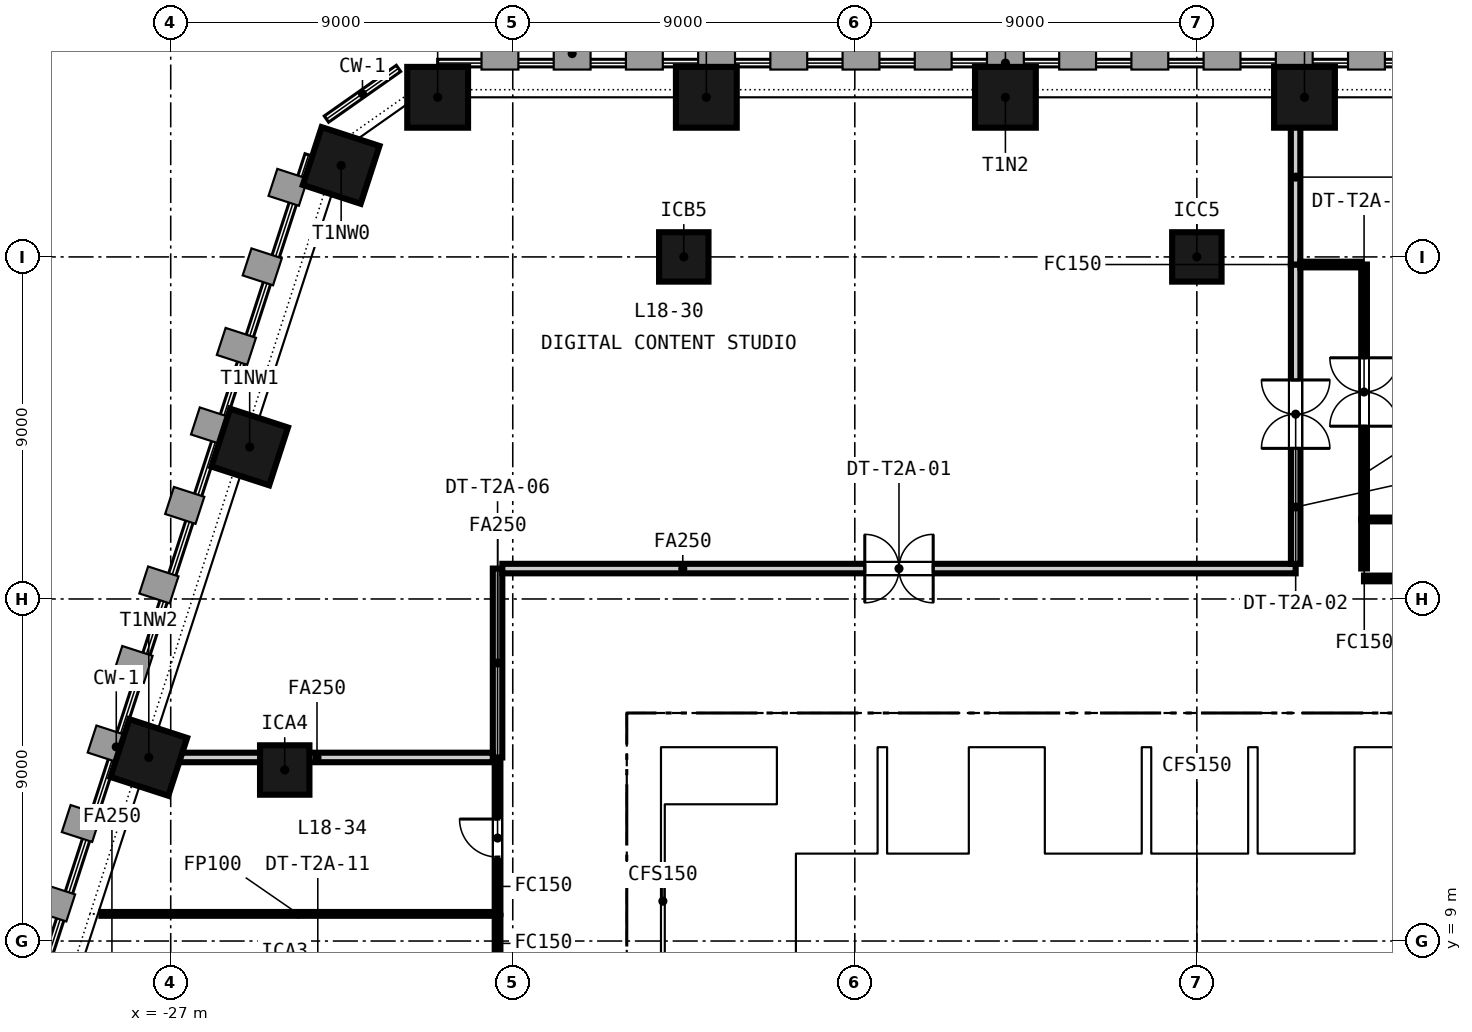
"""IFC4 building model, lengths in metres.
Left out: names, types, materials, properties, quantities, classifications, styles, units other than length and angle.
Written with IfcOpenShell. Run it as: python <this file> out.ifc"""

import sys

from ifc_helpers import new_model, si_unit, direction, frame, frame_2d, origin, origin_2d, place, context, subcontext, project, spatial, rectangle, extrude, element, fill, save


model = new_model("IFC4")
c1 = context("Model", 3, precision=1e-05, world=origin(), true_north=direction((0.0, 1.0)))
c2 = subcontext(c1, "Body", "Model", "MODEL_VIEW")
j1 = project(units=[si_unit("LENGTHUNIT", "METRE"), si_unit("PLANEANGLEUNIT", "RADIAN")], contexts=[c1])
p1 = place(None, origin())
s1 = spatial("IfcSite", under=j1, at=p1, CompositionType="ELEMENT")
p2 = place(p1, origin())
s2 = spatial("IfcBuilding", under=s1, at=p2, CompositionType="ELEMENT")
p3 = place(p2, frame((0.0, 0.0, 80.65)))
s3 = spatial("IfcBuildingStorey", under=s2, at=p3, CompositionType="ELEMENT", Elevation=80.65)
p4 = place(p3, frame((-15.0, 14.55, -0.15), z_axis=(0.0, 0.0, 1.0), x_axis=(1.0, 0.0, 0.0)))
e1 = element("IfcWall", 1, at=p4, inside=s3, PredefinedType="SOLIDWALL", context=c2, shape_type="SweptSolid", body=[
    extrude(rectangle(XDim=30.0, YDim=0.9, at=frame_2d((15.0, 0.0))), origin(), (0.0, 0.0, 1.0), 3.65),
])
p5 = place(p4, frame((9.25, 0.0, 0.15)))
e2 = element("IfcOpeningElement", 2, at=p5, cuts=e1, PredefinedType="OPENING", context=c2, shape_type="SweptSolid", body=[
    extrude(rectangle(XDim=1.5, YDim=2.1, at=frame_2d((0.75, 1.05))), frame((0.0, 0.46, 0.0), z_axis=(0.0, -1.0, 0.0), x_axis=(1.0, 0.0, 0.0)), (0.0, 0.0, 1.0), 0.92),
])
p6 = place(p4, frame((19.4, 0.0, 0.15)))
e3 = element("IfcOpeningElement", 3, at=p6, cuts=e1, PredefinedType="OPENING", context=c2, shape_type="SweptSolid", body=[
    extrude(rectangle(XDim=1.5, YDim=2.1, at=frame_2d((0.75, 1.05))), frame((0.0, 0.46, 0.0), z_axis=(0.0, -1.0, 0.0), x_axis=(1.0, 0.0, 0.0)), (0.0, 0.0, 1.0), 0.92),
])
p7 = place(p4, frame((1.5, 0.0, 0.15)))
e4 = element("IfcOpeningElement", 4, at=p7, cuts=e1, PredefinedType="OPENING", context=c2, shape_type="SweptSolid", body=[
    extrude(rectangle(XDim=1.2, YDim=2.1, at=frame_2d((0.6, 1.05))), frame((0.0, 0.46, 0.0), z_axis=(0.0, -1.0, 0.0), x_axis=(1.0, 0.0, 0.0)), (0.0, 0.0, 1.0), 0.92),
])
p8 = place(p4, frame((27.3, 0.0, 0.15)))
e5 = element("IfcOpeningElement", 5, at=p8, cuts=e1, PredefinedType="OPENING", context=c2, shape_type="SweptSolid", body=[
    extrude(rectangle(XDim=1.2, YDim=2.1, at=frame_2d((0.6, 1.05))), frame((0.0, 0.46, 0.0), z_axis=(0.0, -1.0, 0.0), x_axis=(1.0, 0.0, 0.0)), (0.0, 0.0, 1.0), 0.92),
])
p9 = place(p3, frame((-14.55, 0.9, -0.15), z_axis=(0.0, 0.0, 1.0), x_axis=(0.0, 1.0, 0.0)))
e6 = element("IfcWall", 6, at=p9, inside=s3, PredefinedType="SOLIDWALL", context=c2, shape_type="SweptSolid", body=[
    extrude(rectangle(XDim=13.2, YDim=0.9, at=frame_2d((6.6, 0.0))), origin(), (0.0, 0.0, 1.0), 3.65),
])
p10 = place(p3, frame((-10.8, 0.9, -0.15), z_axis=(0.0, 0.0, 1.0), x_axis=(0.0, 1.0, 0.0)))
e7 = element("IfcWall", 7, at=p10, inside=s3, PredefinedType="SOLIDWALL", context=c2, shape_type="SweptSolid", body=[
    extrude(rectangle(XDim=13.2, YDim=0.5, at=frame_2d((6.6, 0.0))), origin(), (0.0, 0.0, 1.0), 3.65),
])
for number, where, z_axis, x_axis in (
    (8, (2.832, 31.2, -0.15), (0.0, 0.0, 1.0), (-1.0, 0.0, 0.0)),
    (9, (-5.037, 31.2, -0.15), (0.0, 0.0, 1.0), (-1.0, 0.0, 0.0)),
    (10, (-12.907, 31.2, -0.15), (0.0, 0.0, 1.0), (-1.0, 0.0, 0.0)),
    (11, (-19.976, 31.2, -0.15), (0.0, 0.0, 1.0), (-1.0, 0.0, 0.0)),
    (12, (-22.515, 29.407, -0.15), (0.0, 0.0, 1.0), (-0.309, -0.951, 0.0)),
    (13, (-24.923, 21.999, -0.15), (0.0, 0.0, 1.0), (-0.309, -0.951, 0.0)),
    (14, (-27.577, 13.83, -0.15), (0.0, 0.0, 1.0), (-0.309, -0.951, 0.0)),
):
    element("IfcColumn", number, at=place(p3, frame(where, z_axis=z_axis, x_axis=x_axis)), inside=s3, PredefinedType="COLUMN", context=c2, shape_type="SweptSolid", body=[
        extrude(rectangle(XDim=1.6, YDim=1.6, at=origin_2d()), origin(), (0.0, 0.0, 1.0), 3.65),
    ])
for number, where, z_axis, x_axis in (
    (15, (-24.0, 13.5, -0.15), (0.0, 0.0, 1.0), (1.0, 0.0, 0.0)),
    (16, (-13.5, 27.0, -0.15), (0.0, 0.0, 1.0), (1.0, 0.0, 0.0)),
    (17, (0.0, 27.0, -0.15), (0.0, 0.0, 1.0), (1.0, 0.0, 0.0)),
):
    element("IfcColumn", number, at=place(p3, frame(where, z_axis=z_axis, x_axis=x_axis)), inside=s3, PredefinedType="COLUMN", context=c2, shape_type="SweptSolid", body=[
        extrude(rectangle(XDim=1.3, YDim=1.3, at=origin_2d()), origin(), (0.0, 0.0, 1.0), 3.65),
    ])
p11 = place(p3, frame((-10.55, 11.2, 0.0), z_axis=(0.0, 0.0, 1.0), x_axis=(1.0, 0.0, 0.0)))
e18 = element("IfcWall", 18, at=p11, inside=s3, PredefinedType="PARTITIONING", context=c2, shape_type="SweptSolid", body=[
    extrude(rectangle(XDim=4.8, YDim=0.2, at=frame_2d((2.4, 0.0))), origin(), (0.0, 0.0, 1.0), 3.5),
])
p12 = place(p11, frame((0.525, 0.0, 0.0)))
e19 = element("IfcOpeningElement", 19, at=p12, cuts=e18, PredefinedType="OPENING", context=c2, shape_type="SweptSolid", body=[
    extrude(rectangle(XDim=1.1, YDim=2.1, at=frame_2d((0.55, 1.05))), frame((0.0, 0.11, 0.0), z_axis=(0.0, -1.0, 0.0), x_axis=(1.0, 0.0, 0.0)), (0.0, 0.0, 1.0), 0.22),
])
p13 = place(p11, frame((2.925, 0.0, 0.0)))
e20 = element("IfcOpeningElement", 20, at=p13, cuts=e18, PredefinedType="OPENING", context=c2, shape_type="SweptSolid", body=[
    extrude(rectangle(XDim=1.1, YDim=2.1, at=frame_2d((0.55, 1.05))), frame((0.0, 0.11, 0.0), z_axis=(0.0, -1.0, 0.0), x_axis=(1.0, 0.0, 0.0)), (0.0, 0.0, 1.0), 0.22),
])
p14 = place(p3, frame((-4.25, 11.2, 0.0), z_axis=(0.0, 0.0, 1.0), x_axis=(1.0, 0.0, 0.0)))
e21 = element("IfcWall", 21, at=p14, inside=s3, PredefinedType="PARTITIONING", context=c2, shape_type="SweptSolid", body=[
    extrude(rectangle(XDim=8.65, YDim=0.2, at=frame_2d((4.325, 0.0))), origin(), (0.0, 0.0, 1.0), 3.5),
])
p15 = place(p14, frame((0.825, 0.0, 0.0)))
e22 = element("IfcOpeningElement", 22, at=p15, cuts=e21, PredefinedType="OPENING", context=c2, shape_type="SweptSolid", body=[
    extrude(rectangle(XDim=1.4, YDim=2.1, at=frame_2d((0.7, 1.05))), frame((0.0, 0.11, 0.0), z_axis=(0.0, -1.0, 0.0), x_axis=(1.0, 0.0, 0.0)), (0.0, 0.0, 1.0), 0.22),
])
p16 = place(p14, frame((3.625, 0.0, 0.0)))
e23 = element("IfcOpeningElement", 23, at=p16, cuts=e21, PredefinedType="OPENING", context=c2, shape_type="SweptSolid", body=[
    extrude(rectangle(XDim=1.4, YDim=2.1, at=frame_2d((0.7, 1.05))), frame((0.0, 0.11, 0.0), z_axis=(0.0, -1.0, 0.0), x_axis=(1.0, 0.0, 0.0)), (0.0, 0.0, 1.0), 0.22),
])
p17 = place(p3, frame((-4.125, 6.15, 0.0), z_axis=(0.0, 0.0, 1.0), x_axis=(0.0, 1.0, 0.0)))
e24 = element("IfcWall", 24, at=p17, inside=s3, PredefinedType="PARTITIONING", context=c2, shape_type="SweptSolid", body=[
    extrude(rectangle(XDim=4.95, YDim=0.25, at=frame_2d((2.475, 0.0))), origin(), (0.0, 0.0, 1.0), 3.5),
])
p18 = place(p17, frame((3.125, 0.0, 0.0)))
e25 = element("IfcOpeningElement", 25, at=p18, cuts=e24, PredefinedType="OPENING", context=c2, shape_type="SweptSolid", body=[
    extrude(rectangle(XDim=1.2, YDim=2.1, at=frame_2d((0.6, 1.05))), frame((0.0, 0.135, 0.0), z_axis=(0.0, -1.0, 0.0), x_axis=(1.0, 0.0, 0.0)), (0.0, 0.0, 1.0), 0.27),
])
for number, where, z_axis, x_axis in (
    (26, (-8.275, 11.3, 0.0), (0.0, 0.0, 1.0), (0.0, 1.0, 0.0)),
    (27, (-5.875, 11.3, 0.0), (0.0, 0.0, 1.0), (0.0, 1.0, 0.0)),
    (28, (-4.125, 11.3, 0.0), (0.0, 0.0, 1.0), (0.0, 1.0, 0.0)),
    (29, (-1.325, 11.3, 0.0), (0.0, 0.0, 1.0), (0.0, 1.0, 0.0)),
    (30, (1.475, 11.3, 0.0), (0.0, 0.0, 1.0), (0.0, 1.0, 0.0)),
    (31, (4.275, 11.3, 0.0), (0.0, 0.0, 1.0), (0.0, 1.0, 0.0)),
):
    element("IfcWall", number, at=place(p3, frame(where, z_axis=z_axis, x_axis=x_axis)), inside=s3, PredefinedType="PARTITIONING", context=c2, shape_type="SweptSolid", body=[
        extrude(rectangle(XDim=2.8, YDim=0.25, at=frame_2d((1.4, 0.0))), origin(), (0.0, 0.0, 1.0), 3.5),
    ])
p19 = place(p3, frame((-14.05, 0.9, 0.0), z_axis=(0.0, 0.0, 1.0), x_axis=(0.0, 1.0, 0.0)))
e32 = element("IfcWall", 32, at=p19, inside=s3, PredefinedType="SOLIDWALL", context=c2, shape_type="SweptSolid", body=[
    extrude(rectangle(XDim=13.2, YDim=0.1, at=frame_2d((6.6, 0.0))), origin(), (0.0, 0.0, 1.0), 3.5),
])
p20 = place(p3, frame((4.4, 26.8, 0.0), z_axis=(0.0, 0.0, 1.0), x_axis=(0.0, -1.0, 0.0)))
e33 = element("IfcWall", 33, at=p20, inside=s3, PredefinedType="PARTITIONING", context=c2, shape_type="SweptSolid", body=[
    extrude(rectangle(XDim=6.708, YDim=0.15, at=frame_2d((3.354, 0.0))), origin(), (0.0, 0.0, 1.0), 2.741),
])
p21 = place(p20, frame((2.454, 0.0, 0.0)))
e34 = element("IfcOpeningElement", 34, at=p21, cuts=e33, PredefinedType="OPENING", context=c2, shape_type="SweptSolid", body=[
    extrude(rectangle(XDim=1.8, YDim=2.1, at=frame_2d((0.9, 1.05))), frame((0.0, 0.085, 0.0), z_axis=(0.0, -1.0, 0.0), x_axis=(1.0, 0.0, 0.0)), (0.0, 0.0, 1.0), 0.17),
])
p22 = place(p3, frame((4.4, 20.092, 0.0), z_axis=(0.0, 0.0, 1.0), x_axis=(0.0, -1.0, 0.0)))
e35 = element("IfcWall", 35, at=p22, inside=s3, PredefinedType="PARTITIONING", context=c2, shape_type="SweptSolid", body=[
    extrude(rectangle(XDim=1.29, YDim=0.15, at=frame_2d((0.645, 0.0))), origin(), (0.0, 0.0, 1.0), 2.741),
])
p23 = place(p3, frame((-18.4, 13.83, 0.0), z_axis=(0.0, 0.0, 1.0), x_axis=(0.0, 1.0, 0.0)))
e36 = element("IfcWall", 36, at=p23, inside=s3, PredefinedType="PARTITIONING", context=c2, shape_type="SweptSolid", body=[
    extrude(rectangle(XDim=4.97, YDim=0.25, at=frame_2d((2.485, 0.0))), origin(), (0.0, 0.0, 1.0), 2.741),
])
p24 = place(p3, frame((-18.275, 18.8, 0.0), z_axis=(0.0, 0.0, 1.0), x_axis=(1.0, 0.0, 0.0)))
e37 = element("IfcWall", 37, at=p24, inside=s3, PredefinedType="PARTITIONING", context=c2, shape_type="SweptSolid", body=[
    extrude(rectangle(XDim=20.875, YDim=0.25, at=frame_2d((10.438, 0.0))), origin(), (0.0, 0.0, 1.0), 2.741),
])
p25 = place(p24, frame((9.538, 0.0, 0.0)))
e38 = element("IfcOpeningElement", 38, at=p25, cuts=e37, PredefinedType="OPENING", context=c2, shape_type="SweptSolid", body=[
    extrude(rectangle(XDim=1.8, YDim=2.1, at=frame_2d((0.9, 1.05))), frame((0.0, 0.135, 0.0), z_axis=(0.0, -1.0, 0.0), x_axis=(1.0, 0.0, 0.0)), (0.0, 0.0, 1.0), 0.27),
])
p26 = place(p3, frame((2.6, 18.925, 0.0), z_axis=(0.0, 0.0, 1.0), x_axis=(0.0, 1.0, 0.0)))
e39 = element("IfcWall", 39, at=p26, inside=s3, PredefinedType="PARTITIONING", context=c2, shape_type="SweptSolid", body=[
    extrude(rectangle(XDim=7.875, YDim=0.25, at=frame_2d((3.938, 0.0))), origin(), (0.0, 0.0, 1.0), 2.741),
])
p27 = place(p26, frame((3.038, 0.0, 0.0)))
e40 = element("IfcOpeningElement", 40, at=p27, cuts=e39, PredefinedType="OPENING", context=c2, shape_type="SweptSolid", body=[
    extrude(rectangle(XDim=1.8, YDim=2.1, at=frame_2d((0.9, 1.05))), frame((0.0, 0.135, 0.0), z_axis=(0.0, -1.0, 0.0), x_axis=(1.0, 0.0, 0.0)), (0.0, 0.0, 1.0), 0.27),
])
p28 = place(p3, frame((2.598, 26.8, 0.0), z_axis=(0.0, 0.0, 1.0), x_axis=(0.0, 1.0, 0.0)))
e41 = element("IfcWall", 41, at=p28, inside=s3, PredefinedType="PARTITIONING", context=c2, shape_type="SweptSolid", body=[
    extrude(rectangle(XDim=4.6, YDim=0.25, at=frame_2d((2.3, 0.0))), origin(), (0.0, 0.0, 1.0), 2.741),
])
p29 = place(p3, frame((-27.787, 13.83, 0.0), z_axis=(0.0, 0.0, 1.0), x_axis=(1.0, 0.0, 0.0)))
e42 = element("IfcWall", 42, at=p29, inside=s3, PredefinedType="PARTITIONING", context=c2, shape_type="SweptSolid", body=[
    extrude(rectangle(XDim=9.262, YDim=0.25, at=frame_2d((4.631, 0.0))), origin(), (0.0, 0.0, 1.0), 2.741),
])
p30 = place(p3, frame((2.725, 26.8, 0.0), z_axis=(0.0, 0.0, 1.0), x_axis=(1.0, 0.0, 0.0)))
e43 = element("IfcWall", 43, at=p30, inside=s3, PredefinedType="PARTITIONING", context=c2, shape_type="SweptSolid", body=[
    extrude(rectangle(XDim=1.6, YDim=0.15, at=frame_2d((0.8, 0.0))), origin(), (0.0, 0.0, 1.0), 2.741),
])
p31 = place(p3, frame((4.475, 20.092, 0.0), z_axis=(0.0, 0.0, 1.0), x_axis=(1.0, 0.0, 0.0)))
e44 = element("IfcWall", 44, at=p31, inside=s3, PredefinedType="PARTITIONING", context=c2, shape_type="SweptSolid", body=[
    extrude(rectangle(XDim=18.446, YDim=0.1, at=frame_2d((9.223, 0.0))), origin(), (0.0, 0.0, 1.0), 2.741),
])
p32 = place(p3, frame((14.2, 18.542, 0.0), z_axis=(0.0, 0.0, 1.0), x_axis=(-0.999999980148, -0.000199257761, 0.0)))
e45 = element("IfcWall", 45, at=p32, inside=s3, PredefinedType="PARTITIONING", context=c2, shape_type="SweptSolid", body=[
    extrude(rectangle(XDim=9.802, YDim=0.15, at=frame_2d((4.901, 0.0))), origin(), (0.0, 0.0, 1.0), 2.741),
])
p33 = place(p32, frame((4.401, 0.0, 0.0)))
e46 = element("IfcOpeningElement", 46, at=p33, cuts=e45, PredefinedType="OPENING", context=c2, shape_type="SweptSolid", body=[
    extrude(rectangle(XDim=1.0, YDim=2.1, at=frame_2d((0.5, 1.05))), frame((0.0, 0.085, 0.0), z_axis=(0.0, -1.0, 0.0), x_axis=(1.0, 0.0, 0.0)), (0.0, 0.0, 1.0), 0.17),
])
p34 = place(p3, frame((-18.4, 9.714, 0.0), z_axis=(0.0, 0.0, 1.0), x_axis=(0.0, 1.0, 0.0)))
e47 = element("IfcWall", 47, at=p34, inside=s3, PredefinedType="PARTITIONING", context=c2, shape_type="SweptSolid", body=[
    extrude(rectangle(XDim=3.991, YDim=0.15, at=frame_2d((1.996, 0.0))), origin(), (0.0, 0.0, 1.0), 2.741),
])
p35 = place(p34, frame((1.496, 0.0, 0.0)))
e48 = element("IfcOpeningElement", 48, at=p35, cuts=e47, PredefinedType="OPENING", context=c2, shape_type="SweptSolid", body=[
    extrude(rectangle(XDim=1.0, YDim=2.1, at=frame_2d((0.5, 1.05))), frame((0.0, 0.085, 0.0), z_axis=(0.0, -1.0, 0.0), x_axis=(1.0, 0.0, 0.0)), (0.0, 0.0, 1.0), 0.17),
])
p36 = place(p3, frame((-28.824, 9.714, 0.0), z_axis=(0.0, 0.0, 1.0), x_axis=(1.0, 0.0, 0.0)))
e49 = element("IfcWall", 49, at=p36, inside=s3, PredefinedType="PARTITIONING", context=c2, shape_type="SweptSolid", body=[
    extrude(rectangle(XDim=10.349, YDim=0.1, at=frame_2d((5.174, 0.0))), origin(), (0.0, 0.0, 1.0), 2.741),
])
p37 = place(p3, frame((-18.4, 5.711, 0.0), z_axis=(0.0, 0.0, 1.0), x_axis=(0.0, 1.0, 0.0)))
e50 = element("IfcWall", 50, at=p37, inside=s3, PredefinedType="PARTITIONING", context=c2, shape_type="SweptSolid", body=[
    extrude(rectangle(XDim=3.953, YDim=0.15, at=frame_2d((1.977, 0.0))), origin(), (0.0, 0.0, 1.0), 2.741),
])
p38 = place(p37, frame((1.451, 0.0, 0.0)))
e51 = element("IfcOpeningElement", 51, at=p38, cuts=e50, PredefinedType="OPENING", context=c2, shape_type="SweptSolid", body=[
    extrude(rectangle(XDim=1.0, YDim=2.1, at=frame_2d((0.5, 1.05))), frame((0.0, 0.085, 0.0), z_axis=(0.0, -1.0, 0.0), x_axis=(1.0, 0.0, 0.0)), (0.0, 0.0, 1.0), 0.17),
])
p39 = place(p18, origin())
e52 = element("IfcDoor", 52, at=p39, inside=s3, OperationType="SINGLE_SWING_LEFT", PredefinedType="DOOR", context=c2, shape_type="SweptSolid", body=[
    extrude(rectangle(XDim=1.2, YDim=2.1, at=frame_2d((0.6, 1.05))), frame((0.0, 0.025, 0.0), z_axis=(0.0, -1.0, 0.0), x_axis=(1.0, 0.0, 0.0)), (0.0, 0.0, 1.0), 0.05),
])
fill(e25, e52)
p40 = place(p12, origin())
e53 = element("IfcDoor", 53, at=p40, inside=s3, OperationType="DOUBLE_DOOR_SLIDING", PredefinedType="DOOR", context=c2, shape_type="SweptSolid", body=[
    extrude(rectangle(XDim=1.1, YDim=2.1, at=frame_2d((0.55, 1.05))), frame((0.0, 0.025, 0.0), z_axis=(0.0, -1.0, 0.0), x_axis=(1.0, 0.0, 0.0)), (0.0, 0.0, 1.0), 0.05),
])
fill(e19, e53)
p41 = place(p13, origin())
e54 = element("IfcDoor", 54, at=p41, inside=s3, OperationType="DOUBLE_DOOR_SLIDING", PredefinedType="DOOR", context=c2, shape_type="SweptSolid", body=[
    extrude(rectangle(XDim=1.1, YDim=2.1, at=frame_2d((0.55, 1.05))), frame((0.0, 0.025, 0.0), z_axis=(0.0, -1.0, 0.0), x_axis=(1.0, 0.0, 0.0)), (0.0, 0.0, 1.0), 0.05),
])
fill(e20, e54)
p42 = place(p15, origin())
e55 = element("IfcDoor", 55, at=p42, inside=s3, OperationType="DOUBLE_DOOR_SLIDING", PredefinedType="DOOR", context=c2, shape_type="SweptSolid", body=[
    extrude(rectangle(XDim=1.4, YDim=2.1, at=frame_2d((0.7, 1.05))), frame((0.0, 0.025, 0.0), z_axis=(0.0, -1.0, 0.0), x_axis=(1.0, 0.0, 0.0)), (0.0, 0.0, 1.0), 0.05),
])
fill(e22, e55)
p43 = place(p16, origin())
e56 = element("IfcDoor", 56, at=p43, inside=s3, OperationType="DOUBLE_DOOR_SLIDING", PredefinedType="DOOR", context=c2, shape_type="SweptSolid", body=[
    extrude(rectangle(XDim=1.4, YDim=2.1, at=frame_2d((0.7, 1.05))), frame((0.0, 0.025, 0.0), z_axis=(0.0, -1.0, 0.0), x_axis=(1.0, 0.0, 0.0)), (0.0, 0.0, 1.0), 0.05),
])
fill(e23, e56)
p44 = place(p5, origin())
e57 = element("IfcDoor", 57, at=p44, inside=s3, OperationType="DOUBLE_DOOR_SINGLE_SWING", PredefinedType="DOOR", context=c2, shape_type="SweptSolid", body=[
    extrude(rectangle(XDim=1.5, YDim=2.1, at=frame_2d((0.75, 1.05))), frame((0.0, 0.025, 0.0), z_axis=(0.0, -1.0, 0.0), x_axis=(1.0, 0.0, 0.0)), (0.0, 0.0, 1.0), 0.05),
])
fill(e2, e57)
p45 = place(p6, origin())
e58 = element("IfcDoor", 58, at=p45, inside=s3, OperationType="DOUBLE_DOOR_SINGLE_SWING", PredefinedType="DOOR", context=c2, shape_type="SweptSolid", body=[
    extrude(rectangle(XDim=1.5, YDim=2.1, at=frame_2d((0.75, 1.05))), frame((0.0, 0.025, 0.0), z_axis=(0.0, -1.0, 0.0), x_axis=(1.0, 0.0, 0.0)), (0.0, 0.0, 1.0), 0.05),
])
fill(e3, e58)
p46 = place(p7, origin())
e59 = element("IfcDoor", 59, at=p46, inside=s3, OperationType="SINGLE_SWING_RIGHT", PredefinedType="DOOR", context=c2, shape_type="SweptSolid", body=[
    extrude(rectangle(XDim=1.2, YDim=2.1, at=frame_2d((0.6, 1.05))), frame((0.0, 0.025, 0.0), z_axis=(0.0, -1.0, 0.0), x_axis=(1.0, 0.0, 0.0)), (0.0, 0.0, 1.0), 0.05),
])
fill(e4, e59)
p47 = place(p25, origin())
e60 = element("IfcDoor", 60, at=p47, inside=s3, OperationType="DOUBLE_DOOR_DOUBLE_SWING", PredefinedType="DOOR", context=c2, shape_type="SweptSolid", body=[
    extrude(rectangle(XDim=1.8, YDim=2.1, at=frame_2d((0.9, 1.05))), frame((0.0, 0.025, 0.0), z_axis=(0.0, -1.0, 0.0), x_axis=(1.0, 0.0, 0.0)), (0.0, 0.0, 1.0), 0.05),
])
fill(e38, e60)
p48 = place(p27, origin())
e61 = element("IfcDoor", 61, at=p48, inside=s3, OperationType="DOUBLE_DOOR_DOUBLE_SWING", PredefinedType="DOOR", context=c2, shape_type="SweptSolid", body=[
    extrude(rectangle(XDim=1.8, YDim=2.1, at=frame_2d((0.9, 1.05))), frame((0.0, 0.025, 0.0), z_axis=(0.0, -1.0, 0.0), x_axis=(1.0, 0.0, 0.0)), (0.0, 0.0, 1.0), 0.05),
])
fill(e40, e61)
p49 = place(p21, origin())
e62 = element("IfcDoor", 62, at=p49, inside=s3, OperationType="DOUBLE_DOOR_DOUBLE_SWING", PredefinedType="DOOR", context=c2, shape_type="SweptSolid", body=[
    extrude(rectangle(XDim=1.8, YDim=2.1, at=frame_2d((0.9, 1.05))), frame((0.0, 0.025, 0.0), z_axis=(0.0, -1.0, 0.0), x_axis=(1.0, 0.0, 0.0)), (0.0, 0.0, 1.0), 0.05),
])
fill(e34, e62)
p50 = place(p35, origin())
e63 = element("IfcDoor", 63, at=p50, inside=s3, OperationType="SINGLE_SWING_RIGHT", PredefinedType="DOOR", context=c2, shape_type="SweptSolid", body=[
    extrude(rectangle(XDim=1.0, YDim=2.1, at=frame_2d((0.5, 1.05))), frame((0.0, 0.025, 0.0), z_axis=(0.0, -1.0, 0.0), x_axis=(1.0, 0.0, 0.0)), (0.0, 0.0, 1.0), 0.05),
])
fill(e48, e63)
save(model, sys.argv[1])
